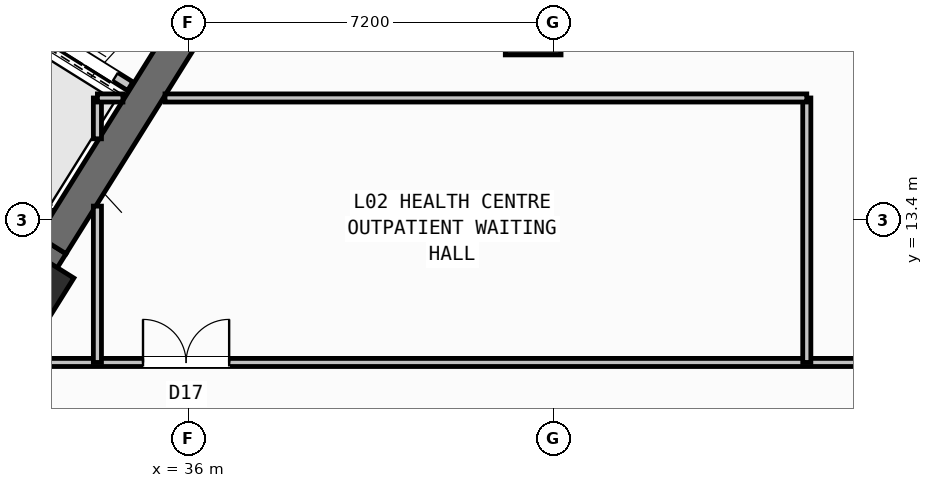
"""IFC4 building model, lengths in metres.
Left out: names, types, materials, properties, quantities, classifications, styles, units other than length and angle.
Written with IfcOpenShell. Run it as: python <this file> out.ifc"""

import sys

from ifc_helpers import new_model, si_unit, direction, frame, frame_2d, origin, origin_2d, place, context, subcontext, project, spatial, rectangle, hollow_rectangle, extrude, source, transform, mapped, element, fill, save


model = new_model("IFC4")
c1 = context("Model", 3, precision=1e-05, world=origin(), true_north=direction((0.0, 1.0)))
c2 = subcontext(c1, "Body", "Model", "MODEL_VIEW")
j1 = project(units=[si_unit("LENGTHUNIT", "METRE"), si_unit("PLANEANGLEUNIT", "RADIAN")], contexts=[c1])
p1 = place(None, origin())
s1 = spatial("IfcSite", under=j1, at=p1, CompositionType="ELEMENT")
p2 = place(p1, origin())
s2 = spatial("IfcBuilding", under=s1, at=p2, CompositionType="ELEMENT")
p3 = place(p2, frame((0.0, 0.0, 10.2)))
s3 = spatial("IfcBuildingStorey", under=s2, at=p3, CompositionType="ELEMENT", Elevation=10.2)
p4 = place(p3, frame((33.409, 12.45, 0.0), z_axis=(0.0, 0.0, 1.0), x_axis=(-0.848051132073, 0.529914405721, 0.0)))
e1 = element("IfcWall", 1, at=p4, inside=s3, PredefinedType="SHEAR", context=c2, shape_type="SweptSolid", body=[
    extrude(rectangle(XDim=13.24, YDim=0.65, at=frame_2d((6.62, 0.0))), origin(), (0.0, 0.0, 1.0), 3.85),
])
p5 = place(p3, frame((36.683, 18.304, 0.0), z_axis=(0.0, 0.0, 1.0), x_axis=(-0.529899109053, -0.848060690178, 0.0)))
e2 = element("IfcWall", 2, at=p5, inside=s3, PredefinedType="SHEAR", context=c2, shape_type="SweptSolid", body=[
    extrude(rectangle(XDim=6.375, YDim=0.65, at=frame_2d((3.188, 0.0))), origin(), (0.0, 0.0, 1.0), 3.85),
])
m1 = source(origin(), c2, "Body", "SweptSolid", [
    extrude(hollow_rectangle(XDim=1.1, YDim=1.1, WallThickness=0.04, at=origin_2d()), origin(), (0.0, 0.0, 1.0), 4.2),
])
p6 = place(p3, frame((42.8, 17.2, 0.0), z_axis=(0.0, 0.0, 1.0), x_axis=(1.0, 0.0, 0.0)))
e3 = element("IfcColumn", 3, at=p6, inside=s3, PredefinedType="COLUMN", context=c2, shape_type="MappedRepresentation", body=[
    mapped(m1, transform((0.0, 0.0, 0.0), scale=1.0)),
])
m2 = source(origin(), c2, "Body", "SweptSolid", [
    extrude(hollow_rectangle(XDim=1.0, YDim=1.0, WallThickness=0.04, at=origin_2d()), origin(), (0.0, 0.0, 1.0), 4.2),
])
p7 = place(p3, frame((33.046, 12.087, 0.0), z_axis=(0.0, 0.0, 1.0), x_axis=(-0.848048096156, 0.529919264233, 0.0)))
e4 = element("IfcColumn", 4, at=p7, inside=s3, PredefinedType="COLUMN", context=c2, shape_type="MappedRepresentation", body=[
    mapped(m2, transform((0.0, 0.0, 0.0), scale=1.0)),
])
p8 = place(p3, frame((34.848, 16.031, 0.0), z_axis=(0.0, 0.0, 1.0), x_axis=(-0.848044042236, 0.529925751807, 0.0)))
e5 = element("IfcWall", 5, at=p8, inside=s3, PredefinedType="STANDARD", context=c2, shape_type="SweptSolid", body=[
    extrude(rectangle(XDim=4.198, YDim=0.2, at=frame_2d((2.099, 0.0))), origin(), (0.0, 0.0, 1.0), 3.84),
])
p9 = place(p8, frame((0.348, 0.0, 0.0)))
e6 = element("IfcOpeningElement", 6, at=p9, cuts=e5, PredefinedType="OPENING", context=c2, shape_type="SweptSolid", body=[
    extrude(rectangle(XDim=1.3, YDim=2.2, at=frame_2d((0.65, 1.1))), frame((0.0, 0.11, 0.0), z_axis=(0.0, -1.0, 0.0), x_axis=(1.0, 0.0, 0.0)), (0.0, 0.0, 1.0), 0.22),
])
p10 = place(p8, frame((2.423, 0.0, 0.0)))
e7 = element("IfcOpeningElement", 7, at=p10, cuts=e5, PredefinedType="OPENING", context=c2, shape_type="SweptSolid", body=[
    extrude(rectangle(XDim=1.45, YDim=2.25, at=frame_2d((0.725, 1.125))), frame((0.0, 0.11, 0.0), z_axis=(0.0, -1.0, 0.0), x_axis=(1.0, 0.0, 0.0)), (0.0, 0.0, 1.0), 0.22),
])
p11 = place(p3, frame((50.119, 16.333, 0.0), z_axis=(0.0, 0.0, 1.0), x_axis=(-0.587749856981, 0.809042709391, 0.0)))
e8 = element("IfcWall", 8, at=p11, inside=s3, PredefinedType="STANDARD", context=c2, shape_type="SweptSolid", body=[
    extrude(rectangle(XDim=2.96, YDim=0.2, at=frame_2d((1.48, 0.0))), origin(), (0.0, 0.0, 1.0), 3.84),
])
p12 = place(p11, frame((0.65, 0.0, 0.0)))
e9 = element("IfcOpeningElement", 9, at=p12, cuts=e8, PredefinedType="OPENING", context=c2, shape_type="SweptSolid", body=[
    extrude(rectangle(XDim=1.5, YDim=2.15, at=frame_2d((0.75, 1.075))), frame((0.0, 0.11, 0.0), z_axis=(0.0, -1.0, 0.0), x_axis=(1.0, 0.0, 0.0)), (0.0, 0.0, 1.0), 0.22),
])
p13 = place(p3, frame((6.1, 10.58, 0.0), z_axis=(0.0, 0.0, 1.0), x_axis=(1.0, 0.0, 0.0)))
e10 = element("IfcWall", 10, at=p13, inside=s3, PredefinedType="PARTITIONING", context=c2, shape_type="SweptSolid", body=[
    extrude(rectangle(XDim=62.1, YDim=0.16, at=frame_2d((31.05, 0.0))), origin(), (0.0, 0.0, 1.0), 3.84),
])
p14 = place(p13, frame((29.0, 0.0, 0.0)))
e11 = element("IfcOpeningElement", 11, at=p14, cuts=e10, PredefinedType="OPENING", context=c2, shape_type="SweptSolid", body=[
    extrude(rectangle(XDim=1.7, YDim=2.2, at=frame_2d((0.85, 1.1))), frame((0.0, 0.09, 0.0), z_axis=(0.0, -1.0, 0.0), x_axis=(1.0, 0.0, 0.0)), (0.0, 0.0, 1.0), 0.18),
])
p15 = place(p13, frame((0.35, 0.0, 0.0)))
e12 = element("IfcOpeningElement", 12, at=p15, cuts=e10, PredefinedType="OPENING", context=c2, shape_type="SweptSolid", body=[
    extrude(rectangle(XDim=1.5, YDim=2.15, at=frame_2d((0.75, 1.075))), frame((0.0, 0.09, 0.0), z_axis=(0.0, -1.0, 0.0), x_axis=(1.0, 0.0, 0.0)), (0.0, 0.0, 1.0), 0.18),
])
p16 = place(p13, frame((5.2, 0.0, 0.0)))
e13 = element("IfcOpeningElement", 13, at=p16, cuts=e10, PredefinedType="OPENING", context=c2, shape_type="SweptSolid", body=[
    extrude(rectangle(XDim=1.08, YDim=2.15, at=frame_2d((0.54, 1.075))), frame((0.0, 0.09, 0.0), z_axis=(0.0, -1.0, 0.0), x_axis=(1.0, 0.0, 0.0)), (0.0, 0.0, 1.0), 0.18),
])
p17 = place(p13, frame((58.5, 0.0, 0.0)))
e14 = element("IfcOpeningElement", 14, at=p17, cuts=e10, PredefinedType="OPENING", context=c2, shape_type="SweptSolid", body=[
    extrude(rectangle(XDim=1.08, YDim=2.15, at=frame_2d((0.54, 1.075))), frame((0.0, 0.09, 0.0), z_axis=(0.0, -1.0, 0.0), x_axis=(1.0, 0.0, 0.0)), (0.0, 0.0, 1.0), 0.18),
])
p18 = place(p3, frame((34.2, 10.58, 0.0), z_axis=(0.0, 0.0, 1.0), x_axis=(0.0, 1.0, 0.0)))
e15 = element("IfcWall", 15, at=p18, inside=s3, PredefinedType="PARTITIONING", context=c2, shape_type="SweptSolid", body=[
    extrude(rectangle(XDim=3.085, YDim=0.16, at=frame_2d((1.543, 0.0))), origin(), (0.0, 0.0, 1.0), 3.84),
])
p19 = place(p3, frame((34.2, 14.994, 0.0), z_axis=(0.0, 0.0, 1.0), x_axis=(0.0, 1.0, 0.0)))
e16 = element("IfcWall", 16, at=p19, inside=s3, PredefinedType="PARTITIONING", context=c2, shape_type="SweptSolid", body=[
    extrude(rectangle(XDim=0.806, YDim=0.16, at=frame_2d((0.403, 0.0))), origin(), (0.0, 0.0, 1.0), 3.84),
])
p20 = place(p3, frame((48.2, 10.58, 0.0), z_axis=(0.0, 0.0, 1.0), x_axis=(0.0, 1.0, 0.0)))
e17 = element("IfcWall", 17, at=p20, inside=s3, PredefinedType="PARTITIONING", context=c2, shape_type="SweptSolid", body=[
    extrude(rectangle(XDim=5.22, YDim=0.16, at=frame_2d((2.61, 0.0))), origin(), (0.0, 0.0, 1.0), 3.84),
])
p21 = place(p3, frame((34.2, 15.8, 0.0), z_axis=(0.0, 0.0, 1.0), x_axis=(1.0, 0.0, 0.0)))
e18 = element("IfcWall", 18, at=p21, inside=s3, PredefinedType="PARTITIONING", context=c2, shape_type="SweptSolid", body=[
    extrude(rectangle(XDim=0.504, YDim=0.16, at=frame_2d((0.252, 0.0))), origin(), (0.0, 0.0, 1.0), 3.84),
])
p22 = place(p3, frame((35.534, 15.8, 0.0), z_axis=(0.0, 0.0, 1.0), x_axis=(1.0, 0.0, 0.0)))
e19 = element("IfcWall", 19, at=p22, inside=s3, PredefinedType="PARTITIONING", context=c2, shape_type="SweptSolid", body=[
    extrude(rectangle(XDim=12.666, YDim=0.16, at=frame_2d((6.333, 0.0))), origin(), (0.0, 0.0, 1.0), 3.84),
])
m3 = source(origin(), c2, "Body", "SweptSolid", [
    extrude(rectangle(XDim=1.3, YDim=2.2, at=frame_2d((0.65, 1.1))), frame((0.0, 0.025, 0.0), z_axis=(0.0, -1.0, 0.0), x_axis=(1.0, 0.0, 0.0)), (0.0, 0.0, 1.0), 0.05),
])
p23 = place(p9, origin())
e20 = element("IfcDoor", 20, at=p23, inside=s3, OperationType="DOUBLE_DOOR_SLIDING", PredefinedType="DOOR", context=c2, shape_type="MappedRepresentation", body=[
    mapped(m3, transform((0.0, 0.0, 0.0), scale=1.0)),
])
fill(e6, e20)
m4 = source(origin(), c2, "Body", "SweptSolid", [
    extrude(rectangle(XDim=1.7, YDim=2.2, at=frame_2d((0.85, 1.1))), frame((0.0, 0.025, 0.0), z_axis=(0.0, -1.0, 0.0), x_axis=(1.0, 0.0, 0.0)), (0.0, 0.0, 1.0), 0.05),
])
p24 = place(p14, origin())
e21 = element("IfcDoor", 21, at=p24, inside=s3, OperationType="DOUBLE_DOOR_SINGLE_SWING", PredefinedType="DOOR", context=c2, shape_type="MappedRepresentation", body=[
    mapped(m4, transform((0.0, 0.0, 0.0), scale=1.0)),
])
fill(e11, e21)
save(model, sys.argv[1])
